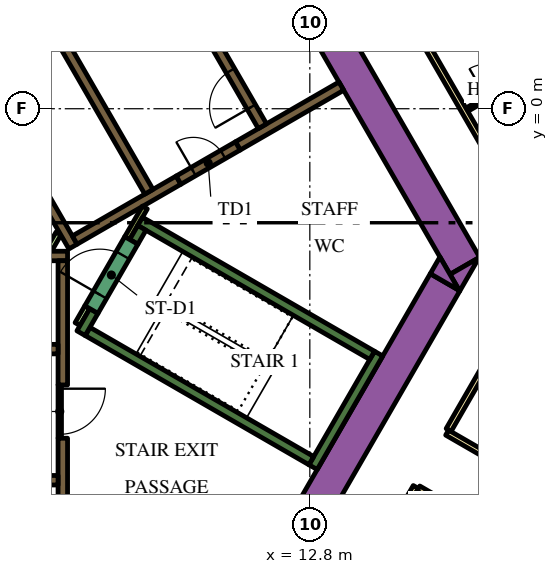
"""IFC4 building model, lengths in metres.
Left out: names, types, materials, properties, quantities, classifications, styles, units other than length and angle.
Written with IfcOpenShell. Run it as: python <this file> out.ifc"""

import sys

from ifc_helpers import new_model, si_unit, direction, frame, frame_2d, origin, place, context, subcontext, project, spatial, polyline, rectangle, outline, extrude, element, fill, save


model = new_model("IFC4")
c1 = context("Model", 3, precision=1e-05, world=origin(), true_north=direction((0.0, 1.0)))
c2 = subcontext(c1, "Body", "Model", "MODEL_VIEW")
j1 = project(units=[si_unit("LENGTHUNIT", "METRE"), si_unit("PLANEANGLEUNIT", "RADIAN")], contexts=[c1])
p1 = place(None, origin())
s1 = spatial("IfcSite", under=j1, at=p1, CompositionType="ELEMENT")
p2 = place(p1, origin())
s2 = spatial("IfcBuilding", under=s1, at=p2, CompositionType="ELEMENT")
p3 = place(p2, frame((0.0, 0.0, 87.6)))
s3 = spatial("IfcBuildingStorey", under=s2, at=p3, CompositionType="ELEMENT", Elevation=87.6)
p4 = place(p3, frame((6.776, 13.364, 0.0), z_axis=(0.0, 0.0, 1.0), x_axis=(0.500004177138, -0.8660229921, 0.0)))
e1 = element("IfcWall", 1, at=p4, inside=s3, PredefinedType="SOLIDWALL", context=c2, shape_type="SweptSolid", body=[
    extrude(rectangle(XDim=20.204, YDim=0.9, at=frame_2d((10.102, 0.0))), origin(), (0.0, 0.0, 1.0), 3.9),
])
p5 = place(p3, origin())
e2 = element("IfcWall", 2, at=p5, inside=s3, PredefinedType="SOLIDWALL", context=c2, shape_type="SweptSolid", body=[
    extrude(outline(polyline([(16.743, -4.8), (16.489, -4.36), (17.251, -3.92), (16.743, -4.8)])), origin(), (0.0, 0.0, 1.0), 3.9),
])
p6 = place(p3, frame((11.695, -12.644, 0.0), z_axis=(0.0, 0.0, 1.0), x_axis=(0.500010229568, 0.86601949766, 0.0)))
e3 = element("IfcWall", 3, at=p6, inside=s3, PredefinedType="SOLIDWALL", context=c2, shape_type="SweptSolid", body=[
    extrude(rectangle(XDim=9.326, YDim=0.9, at=frame_2d((4.663, 0.0))), origin(), (0.0, 0.0, 1.0), 3.9),
])
e4 = element("IfcWall", 4, at=p5, inside=s3, PredefinedType="SOLIDWALL", context=c2, shape_type="SweptSolid", body=[
    extrude(outline(polyline([(16.223, -3.9), (16.732, -4.78), (15.969, -4.34), (16.223, -3.9)])), origin(), (0.0, 0.0, 1.0), 3.9),
])
p7 = place(p3, frame((12.885, -9.431, 0.0), z_axis=(0.0, 0.0, 1.0), x_axis=(0.500020560727, 0.866013532718, 0.0)))
e5 = element("IfcWall", 5, at=p7, inside=s3, PredefinedType="SOLIDWALL", context=c2, shape_type="SweptSolid", body=[
    extrude(rectangle(XDim=3.45, YDim=0.25, at=frame_2d((1.725, 0.0))), origin(), (0.0, 0.0, 1.0), 3.9),
])
p8 = place(p3, frame((12.84, -9.261, 0.0), z_axis=(0.0, 0.0, 1.0), x_axis=(-0.866013990052, 0.500019768644, 0.0)))
e6 = element("IfcWall", 6, at=p8, inside=s3, PredefinedType="SOLIDWALL", context=c2, shape_type="SweptSolid", body=[
    extrude(rectangle(XDim=6.8, YDim=0.25, at=frame_2d((3.4, 0.0))), origin(), (0.0, 0.0, 1.0), 3.9),
])
p9 = place(p3, frame((6.78, -5.906, 0.0), z_axis=(0.0, 0.0, 1.0), x_axis=(0.500223362819, 0.865896406789, 0.0)))
e7 = element("IfcWall", 7, at=p9, inside=s3, PredefinedType="SOLIDWALL", context=c2, shape_type="SweptSolid", body=[
    extrude(rectangle(XDim=0.675, YDim=0.25, at=frame_2d((0.337, 0.0))), origin(), (0.0, 0.0, 1.0), 3.9),
])
p10 = place(p3, frame((8.334, -2.964, 0.0), z_axis=(0.0, 0.0, 1.0), x_axis=(0.866016039709, -0.500016218704, 0.0)))
e8 = element("IfcWall", 8, at=p10, inside=s3, PredefinedType="SOLIDWALL", context=c2, shape_type="SweptSolid", body=[
    extrude(rectangle(XDim=7.05, YDim=0.25, at=frame_2d((3.525, 0.0))), origin(), (0.0, 0.0, 1.0), 3.9),
])
p11 = place(p3, frame((8.168, -3.503, 0.0), z_axis=(0.0, 0.0, 1.0), x_axis=(0.49972245349, 0.866185586049, 0.0)))
e9 = element("IfcWall", 9, at=p11, inside=s3, PredefinedType="SOLIDWALL", context=c2, shape_type="SweptSolid", body=[
    extrude(rectangle(XDim=0.425, YDim=0.25, at=frame_2d((0.212, 0.0))), origin(), (0.0, 0.0, 1.0), 3.9),
])
p12 = place(p3, frame((-5.845, -3.875, 0.0), z_axis=(0.0, 0.0, 1.0), x_axis=(1.0, 0.0, 0.0)))
e10 = element("IfcWall", 10, at=p12, inside=s3, PredefinedType="SOLIDWALL", context=c2, shape_type="SweptSolid", body=[
    extrude(rectangle(XDim=12.27, YDim=0.25, at=frame_2d((6.135, 0.0))), origin(), (0.0, 0.0, 1.0), 3.9),
])
p13 = place(p3, frame((6.3, -8.67, 0.0), z_axis=(0.0, 0.0, 1.0), x_axis=(0.0, -1.0, 0.0)))
e11 = element("IfcWall", 11, at=p13, inside=s3, PredefinedType="SOLIDWALL", context=c2, shape_type="SweptSolid", body=[
    extrude(rectangle(XDim=3.43, YDim=0.25, at=frame_2d((1.715, 0.0))), origin(), (0.0, 0.0, 1.0), 3.9),
])
p14 = place(p3, frame((6.3, -7.268, 0.0), z_axis=(0.0, 0.0, 1.0), x_axis=(0.0, 1.0, 0.0)))
e12 = element("IfcWall", 12, at=p14, inside=s3, PredefinedType="SOLIDWALL", context=c2, shape_type="SweptSolid", body=[
    extrude(rectangle(XDim=3.268, YDim=0.25, at=frame_2d((1.634, 0.0))), origin(), (0.0, 0.0, 1.0), 3.9),
])
p15 = place(p3, frame((13.629, 0.594, 0.0), z_axis=(0.0, 0.0, 1.0), x_axis=(-0.86602790099, -0.499995674689, 0.0)))
e13 = element("IfcWall", 13, at=p15, inside=s3, PredefinedType="SOLIDWALL", context=c2, shape_type="SweptSolid", body=[
    extrude(rectangle(XDim=3.146, YDim=0.25, at=frame_2d((1.573, 0.0))), origin(), (0.0, 0.0, 1.0), 3.9),
])
e14 = element("IfcWall", 14, at=p5, inside=s3, PredefinedType="SOLIDWALL", context=c2, shape_type="SweptSolid", body=[
    extrude(outline(polyline([(0.335, 6.925), (0.335, 7.075), (0.335, 7.075), (0.335, 7.075), (0.245, 7.075), (0.079, 7.363), (0.035, 7.439), (0.252, 7.564), (0.377, 7.348), (6.552, -3.348), (6.677, -3.564), (6.46, -3.689), (4.897, -0.981), (0.332, 6.925), (0.335, 6.925), (0.335, 6.925), (0.335, 6.925)])), origin(), (0.0, 0.0, 1.0), 3.9),
])
p16 = place(p3, frame((6.614, -3.456, 0.0), z_axis=(0.0, 0.0, 1.0), x_axis=(0.86602447079, 0.500001615989, 0.0)))
e15 = element("IfcWall", 15, at=p16, inside=s3, PredefinedType="SOLIDWALL", context=c2, shape_type="SweptSolid", body=[
    extrude(rectangle(XDim=3.154, YDim=0.25, at=frame_2d((1.577, 0.0))), origin(), (0.0, 0.0, 1.0), 3.9),
])
p17 = place(p3, frame((6.945, -5.222, 0.0), z_axis=(0.0, 0.0, 1.0), x_axis=(-0.499818422106, -0.866130212453, 0.0)))
e16 = element("IfcWall", 16, at=p17, inside=s3, PredefinedType="PARTITIONING", context=c2, shape_type="SweptSolid", body=[
    extrude(rectangle(XDim=0.514, YDim=0.15, at=frame_2d((0.257, 0.0))), origin(), (0.0, 0.0, 1.0), 2.75),
])
p18 = place(p3, frame((5.936, -3.718, 0.0), z_axis=(0.0, 0.0, 1.0), x_axis=(0.499890179513, 0.866088799389, 0.0)))
e17 = element("IfcWall", 17, at=p18, inside=s3, PredefinedType="PARTITIONING", context=c2, shape_type="SweptSolid", body=[
    extrude(rectangle(XDim=0.504, YDim=0.15, at=frame_2d((0.252, 0.0))), origin(), (0.0, 0.0, 1.0), 2.75),
])
p19 = place(p3, frame((8.459, -2.599, 0.0), z_axis=(0.0, 0.0, 1.0), x_axis=(-0.500041054325, -0.866001699761, 0.0)))
e18 = element("IfcWall", 18, at=p19, inside=s3, PredefinedType="PARTITIONING", context=c2, shape_type="SweptSolid", body=[
    extrude(rectangle(XDim=0.929, YDim=0.15, at=frame_2d((0.464, 0.0))), origin(), (0.0, 0.0, 1.0), 3.9),
])
p20 = place(p3, frame((-6.175, -9.775, 0.0), z_axis=(0.0, 0.0, 1.0), x_axis=(1.0, 0.0, 0.0)))
e19 = element("IfcWall", 19, at=p20, inside=s3, PredefinedType="SOLIDWALL", context=c2, shape_type="SweptSolid", body=[
    extrude(rectangle(XDim=12.35, YDim=0.25, at=frame_2d((6.175, 0.0))), origin(), (0.0, 0.0, 1.0), 3.9),
])
p21 = place(p20, frame((0.585, 0.0, 0.0)))
e20 = element("IfcOpeningElement", 20, at=p21, cuts=e19, PredefinedType="OPENING", context=c2, shape_type="SweptSolid", body=[
    extrude(rectangle(XDim=1.1, YDim=2.1, at=frame_2d((0.55, 1.05))), frame((0.0, 0.135, 0.0), z_axis=(0.0, -1.0, 0.0), x_axis=(1.0, 0.0, 0.0)), (0.0, 0.0, 1.0), 0.27),
])
p22 = place(p20, frame((3.105, 0.0, 0.0)))
e21 = element("IfcOpeningElement", 21, at=p22, cuts=e19, PredefinedType="OPENING", context=c2, shape_type="SweptSolid", body=[
    extrude(rectangle(XDim=1.1, YDim=2.1, at=frame_2d((0.55, 1.05))), frame((0.0, 0.135, 0.0), z_axis=(0.0, -1.0, 0.0), x_axis=(1.0, 0.0, 0.0)), (0.0, 0.0, 1.0), 0.27),
])
p23 = place(p20, frame((5.625, 0.0, 0.0)))
e22 = element("IfcOpeningElement", 22, at=p23, cuts=e19, PredefinedType="OPENING", context=c2, shape_type="SweptSolid", body=[
    extrude(rectangle(XDim=1.1, YDim=2.1, at=frame_2d((0.55, 1.05))), frame((0.0, 0.135, 0.0), z_axis=(0.0, -1.0, 0.0), x_axis=(1.0, 0.0, 0.0)), (0.0, 0.0, 1.0), 0.27),
])
p24 = place(p20, frame((8.145, 0.0, 0.0)))
e23 = element("IfcOpeningElement", 23, at=p24, cuts=e19, PredefinedType="OPENING", context=c2, shape_type="SweptSolid", body=[
    extrude(rectangle(XDim=1.1, YDim=2.1, at=frame_2d((0.55, 1.05))), frame((0.0, 0.135, 0.0), z_axis=(0.0, -1.0, 0.0), x_axis=(1.0, 0.0, 0.0)), (0.0, 0.0, 1.0), 0.27),
])
p25 = place(p20, frame((10.665, 0.0, 0.0)))
e24 = element("IfcOpeningElement", 24, at=p25, cuts=e19, PredefinedType="OPENING", context=c2, shape_type="SweptSolid", body=[
    extrude(rectangle(XDim=1.1, YDim=2.1, at=frame_2d((0.55, 1.05))), frame((0.0, 0.135, 0.0), z_axis=(0.0, -1.0, 0.0), x_axis=(1.0, 0.0, 0.0)), (0.0, 0.0, 1.0), 0.27),
])
p26 = place(p3, frame((-6.175, -6.325, 0.0), z_axis=(0.0, 0.0, 1.0), x_axis=(1.0, 0.0, 0.0)))
e25 = element("IfcWall", 25, at=p26, inside=s3, PredefinedType="SOLIDWALL", context=c2, shape_type="SweptSolid", body=[
    extrude(rectangle(XDim=12.35, YDim=0.25, at=frame_2d((6.175, 0.0))), origin(), (0.0, 0.0, 1.0), 3.9),
])
p27 = place(p26, frame((3.205, 0.0, 0.0)))
e26 = element("IfcOpeningElement", 26, at=p27, cuts=e25, PredefinedType="OPENING", context=c2, shape_type="SweptSolid", body=[
    extrude(rectangle(XDim=0.9, YDim=2.1, at=frame_2d((0.45, 1.05))), frame((0.0, 0.135, 0.0), z_axis=(0.0, -1.0, 0.0), x_axis=(1.0, 0.0, 0.0)), (0.0, 0.0, 1.0), 0.27),
])
p28 = place(p26, frame((8.145, 0.0, 0.0)))
e27 = element("IfcOpeningElement", 27, at=p28, cuts=e25, PredefinedType="OPENING", context=c2, shape_type="SweptSolid", body=[
    extrude(rectangle(XDim=1.1, YDim=2.1, at=frame_2d((0.55, 1.05))), frame((0.0, 0.135, 0.0), z_axis=(0.0, -1.0, 0.0), x_axis=(1.0, 0.0, 0.0)), (0.0, 0.0, 1.0), 0.27),
])
p29 = place(p26, frame((10.665, 0.0, 0.0)))
e28 = element("IfcOpeningElement", 28, at=p29, cuts=e25, PredefinedType="OPENING", context=c2, shape_type="SweptSolid", body=[
    extrude(rectangle(XDim=1.1, YDim=2.1, at=frame_2d((0.55, 1.05))), frame((0.0, 0.135, 0.0), z_axis=(0.0, -1.0, 0.0), x_axis=(1.0, 0.0, 0.0)), (0.0, 0.0, 1.0), 0.27),
])
p30 = place(p3, frame((11.553, -0.46, 0.0), z_axis=(0.0, 0.0, 1.0), x_axis=(-0.500006514828, 0.866021642414, 0.0)))
e29 = element("IfcWall", 29, at=p30, inside=s3, PredefinedType="SOLIDWALL", context=c2, shape_type="SweptSolid", body=[
    extrude(rectangle(XDim=12.35, YDim=0.25, at=frame_2d((6.175, 0.0))), origin(), (0.0, 0.0, 1.0), 3.9),
])
p31 = place(p30, frame((0.585, 0.0, 0.0)))
e30 = element("IfcOpeningElement", 30, at=p31, cuts=e29, PredefinedType="OPENING", context=c2, shape_type="SweptSolid", body=[
    extrude(rectangle(XDim=1.1, YDim=2.1, at=frame_2d((0.55, 1.05))), frame((0.0, 0.135, 0.0), z_axis=(0.0, -1.0, 0.0), x_axis=(1.0, 0.0, 0.0)), (0.0, 0.0, 1.0), 0.27),
])
p32 = place(p30, frame((3.105, 0.0, 0.0)))
e31 = element("IfcOpeningElement", 31, at=p32, cuts=e29, PredefinedType="OPENING", context=c2, shape_type="SweptSolid", body=[
    extrude(rectangle(XDim=1.1, YDim=2.1, at=frame_2d((0.55, 1.05))), frame((0.0, 0.135, 0.0), z_axis=(0.0, -1.0, 0.0), x_axis=(1.0, 0.0, 0.0)), (0.0, 0.0, 1.0), 0.27),
])
p33 = place(p30, frame((5.625, 0.0, 0.0)))
e32 = element("IfcOpeningElement", 32, at=p33, cuts=e29, PredefinedType="OPENING", context=c2, shape_type="SweptSolid", body=[
    extrude(rectangle(XDim=1.1, YDim=2.1, at=frame_2d((0.55, 1.05))), frame((0.0, 0.135, 0.0), z_axis=(0.0, -1.0, 0.0), x_axis=(1.0, 0.0, 0.0)), (0.0, 0.0, 1.0), 0.27),
])
p34 = place(p3, frame((8.565, -2.185, 0.0), z_axis=(0.0, 0.0, 1.0), x_axis=(-0.499997954832, 0.866026584559, 0.0)))
e33 = element("IfcWall", 33, at=p34, inside=s3, PredefinedType="SOLIDWALL", context=c2, shape_type="SweptSolid", body=[
    extrude(rectangle(XDim=12.35, YDim=0.25, at=frame_2d((6.175, 0.0))), origin(), (0.0, 0.0, 1.0), 3.9),
])
p35 = place(p34, frame((5.725, 0.0, 0.0)))
e34 = element("IfcOpeningElement", 34, at=p35, cuts=e33, PredefinedType="OPENING", context=c2, shape_type="SweptSolid", body=[
    extrude(rectangle(XDim=0.9, YDim=2.1, at=frame_2d((0.45, 1.05))), frame((0.0, 0.135, 0.0), z_axis=(0.0, -1.0, 0.0), x_axis=(1.0, 0.0, 0.0)), (0.0, 0.0, 1.0), 0.27),
])
p36 = place(p3, frame((7.053, -5.284, 0.0), z_axis=(0.0, 0.0, 1.0), x_axis=(0.500078061341, 0.865980330357, 0.0)))
e35 = element("IfcWall", 35, at=p36, inside=s3, PredefinedType="SOLIDWALL", context=c2, shape_type="SweptSolid", body=[
    extrude(rectangle(XDim=2.1, YDim=0.4, at=frame_2d((1.05, 0.0))), origin(), (0.0, 0.0, 1.0), 3.9),
])
p37 = place(p36, frame((0.45, 0.0, 0.0)))
e36 = element("IfcOpeningElement", 36, at=p37, cuts=e35, PredefinedType="OPENING", context=c2, shape_type="SweptSolid", body=[
    extrude(rectangle(XDim=1.2, YDim=2.1, at=frame_2d((0.6, 1.05))), frame((0.0, 0.21, 0.0), z_axis=(0.0, -1.0, 0.0), x_axis=(1.0, 0.0, 0.0)), (0.0, 0.0, 1.0), 0.42),
])
p38 = place(p3, frame((9.346, -1.879, 0.0), z_axis=(0.0, 0.0, 1.0), x_axis=(0.866047807691, 0.499961193289, 0.0)))
e37 = element("IfcWall", 37, at=p38, inside=s3, PredefinedType="SOLIDWALL", context=c2, shape_type="SweptSolid", body=[
    extrude(rectangle(XDim=1.8, YDim=0.25, at=frame_2d((0.9, 0.0))), origin(), (0.0, 0.0, 1.0), 3.9),
])
p39 = place(p38, frame((0.45, 0.0, 0.0)))
e38 = element("IfcOpeningElement", 38, at=p39, cuts=e37, PredefinedType="OPENING", context=c2, shape_type="SweptSolid", body=[
    extrude(rectangle(XDim=0.9, YDim=2.1, at=frame_2d((0.45, 1.05))), frame((0.0, 0.135, 0.0), z_axis=(0.0, -1.0, 0.0), x_axis=(1.0, 0.0, 0.0)), (0.0, 0.0, 1.0), 0.27),
])
p40 = place(p3, frame((6.22, -7.266, 0.0), z_axis=(0.0, 0.0, 1.0), x_axis=(0.0, -1.0, 0.0)))
e39 = element("IfcWall", 39, at=p40, inside=s3, PredefinedType="PARTITIONING", context=c2, shape_type="SweptSolid", body=[
    extrude(rectangle(XDim=1.4, YDim=0.09, at=frame_2d((0.7, 0.0))), origin(), (0.0, 0.0, 1.0), 2.75),
])
p41 = place(p40, frame((0.1, 0.0, 0.0)))
e40 = element("IfcOpeningElement", 40, at=p41, cuts=e39, PredefinedType="OPENING", context=c2, shape_type="SweptSolid", body=[
    extrude(rectangle(XDim=1.2, YDim=2.1, at=frame_2d((0.6, 1.05))), frame((0.0, 0.055, 0.0), z_axis=(0.0, -1.0, 0.0), x_axis=(1.0, 0.0, 0.0)), (0.0, 0.0, 1.0), 0.11),
])
p42 = place(p3, frame((16.412, -8.523, 0.0), z_axis=(0.0, 0.0, 1.0), x_axis=(0.866025629663, -0.499999608766, 0.0)))
e41 = element("IfcWall", 41, at=p42, inside=s3, PredefinedType="PARTITIONING", context=c2, shape_type="SweptSolid", body=[
    extrude(rectangle(XDim=13.624, YDim=0.15, at=frame_2d((6.812, 0.0))), origin(), (0.0, 0.0, 1.0), 2.75),
])
p43 = place(p42, frame((4.134, 0.0, 0.0)))
e42 = element("IfcOpeningElement", 42, at=p43, cuts=e41, PredefinedType="OPENING", context=c2, shape_type="SweptSolid", body=[
    extrude(rectangle(XDim=1.0, YDim=2.1, at=frame_2d((0.5, 1.05))), frame((0.0, 0.085, 0.0), z_axis=(0.0, -1.0, 0.0), x_axis=(1.0, 0.0, 0.0)), (0.0, 0.0, 1.0), 0.17),
])
p44 = place(p3, frame((19.081, -3.9, 0.0), z_axis=(0.0, 0.0, 1.0), x_axis=(-0.499974327079, -0.866040225545, 0.0)))
e43 = element("IfcWall", 43, at=p44, inside=s3, PredefinedType="PARTITIONING", context=c2, shape_type="SweptSolid", body=[
    extrude(rectangle(XDim=5.258, YDim=0.15, at=frame_2d((2.629, 0.0))), origin(), (0.0, 0.0, 1.0), 2.75),
])
p45 = place(p44, frame((0.18, 0.0, 0.0)))
e44 = element("IfcOpeningElement", 44, at=p45, cuts=e43, PredefinedType="OPENING", context=c2, shape_type="SweptSolid", body=[
    extrude(rectangle(XDim=1.0, YDim=2.1, at=frame_2d((0.5, 1.05))), frame((0.0, 0.085, 0.0), z_axis=(0.0, -1.0, 0.0), x_axis=(1.0, 0.0, 0.0)), (0.0, 0.0, 1.0), 0.17),
])
p46 = place(p3, frame((6.163, 18.475, 0.0), z_axis=(0.0, 0.0, 1.0), x_axis=(0.500001317485, -0.866024643133, 0.0)))
e45 = element("IfcWall", 45, at=p46, inside=s3, PredefinedType="PARTITIONING", context=c2, shape_type="SweptSolid", body=[
    extrude(rectangle(XDim=25.767, YDim=0.15, at=frame_2d((12.883, 0.0))), origin(), (0.0, 0.0, 1.0), 2.75),
])
p47 = place(p46, frame((24.241, 0.0, 0.0)))
e46 = element("IfcOpeningElement", 46, at=p47, cuts=e45, PredefinedType="OPENING", context=c2, shape_type="SweptSolid", body=[
    extrude(rectangle(XDim=1.0, YDim=2.1, at=frame_2d((0.5, 1.05))), frame((0.0, 0.085, 0.0), z_axis=(0.0, -1.0, 0.0), x_axis=(1.0, 0.0, 0.0)), (0.0, 0.0, 1.0), 0.17),
])
p48 = place(p46, frame((13.144, 0.0, 0.0)))
e47 = element("IfcOpeningElement", 47, at=p48, cuts=e45, PredefinedType="OPENING", context=c2, shape_type="SweptSolid", body=[
    extrude(rectangle(XDim=1.0, YDim=2.1, at=frame_2d((0.5, 1.05))), frame((0.0, 0.085, 0.0), z_axis=(0.0, -1.0, 0.0), x_axis=(1.0, 0.0, 0.0)), (0.0, 0.0, 1.0), 0.17),
])
p49 = place(p46, frame((10.874, 0.0, 0.0)))
e48 = element("IfcOpeningElement", 48, at=p49, cuts=e45, PredefinedType="OPENING", context=c2, shape_type="SweptSolid", body=[
    extrude(rectangle(XDim=0.9, YDim=2.1, at=frame_2d((0.45, 1.05))), frame((0.0, 0.085, 0.0), z_axis=(0.0, -1.0, 0.0), x_axis=(1.0, 0.0, 0.0)), (0.0, 0.0, 1.0), 0.17),
])
p50 = place(p46, frame((3.718, 0.0, 0.0)))
e49 = element("IfcOpeningElement", 49, at=p50, cuts=e45, PredefinedType="OPENING", context=c2, shape_type="SweptSolid", body=[
    extrude(rectangle(XDim=1.1, YDim=2.1, at=frame_2d((0.55, 1.05))), frame((0.0, 0.085, 0.0), z_axis=(0.0, -1.0, 0.0), x_axis=(1.0, 0.0, 0.0)), (0.0, 0.0, 1.0), 0.17),
])
p51 = place(p46, frame((2.411, 0.0, 0.0)))
e50 = element("IfcOpeningElement", 50, at=p51, cuts=e45, PredefinedType="OPENING", context=c2, shape_type="SweptSolid", body=[
    extrude(rectangle(XDim=1.0, YDim=2.1, at=frame_2d((0.5, 1.05))), frame((0.0, 0.085, 0.0), z_axis=(0.0, -1.0, 0.0), x_axis=(1.0, 0.0, 0.0)), (0.0, 0.0, 1.0), 0.17),
])
p52 = place(p3, frame((15.587, -9.952, 0.0), z_axis=(0.0, 0.0, 1.0), x_axis=(-0.500016618951, -0.866015808616, 0.0)))
e51 = element("IfcWall", 51, at=p52, inside=s3, PredefinedType="PARTITIONING", context=c2, shape_type="SweptSolid", body=[
    extrude(rectangle(XDim=5.268, YDim=0.15, at=frame_2d((2.634, 0.0))), origin(), (0.0, 0.0, 1.0), 2.75),
])
p53 = place(p3, frame((27.386, -16.764, 0.0), z_axis=(0.0, 0.0, 1.0), x_axis=(-0.866022585856, 0.500004880763, 0.0)))
e52 = element("IfcWall", 52, at=p53, inside=s3, PredefinedType="PARTITIONING", context=c2, shape_type="SweptSolid", body=[
    extrude(rectangle(XDim=13.544, YDim=0.15, at=frame_2d((6.772, 0.0))), origin(), (0.0, 0.0, 1.0), 2.75),
])
p54 = place(p53, frame((12.214, 0.0, 0.0)))
e53 = element("IfcOpeningElement", 53, at=p54, cuts=e52, PredefinedType="OPENING", context=c2, shape_type="SweptSolid", body=[
    extrude(rectangle(XDim=1.0, YDim=2.1, at=frame_2d((0.5, 1.05))), frame((0.0, 0.085, 0.0), z_axis=(0.0, -1.0, 0.0), x_axis=(1.0, 0.0, 0.0)), (0.0, 0.0, 1.0), 0.17),
])
p55 = place(p53, frame((8.49, 0.0, 0.0)))
e54 = element("IfcOpeningElement", 54, at=p55, cuts=e52, PredefinedType="OPENING", context=c2, shape_type="SweptSolid", body=[
    extrude(rectangle(XDim=1.0, YDim=2.1, at=frame_2d((0.5, 1.05))), frame((0.0, 0.085, 0.0), z_axis=(0.0, -1.0, 0.0), x_axis=(1.0, 0.0, 0.0)), (0.0, 0.0, 1.0), 0.17),
])
p56 = place(p3, frame((16.931, -0.026, 0.0), z_axis=(0.0, 0.0, 1.0), x_axis=(0.866059108428, 0.4999416173, 0.0)))
e55 = element("IfcWall", 55, at=p56, inside=s3, PredefinedType="PARTITIONING", context=c2, shape_type="SweptSolid", body=[
    extrude(rectangle(XDim=2.7, YDim=0.1, at=frame_2d((1.35, 0.0))), origin(), (0.0, 0.0, 1.0), 2.75),
])
p57 = place(p56, frame((0.6, 0.0, 0.0)))
e56 = element("IfcOpeningElement", 56, at=p57, cuts=e55, PredefinedType="OPENING", context=c2, shape_type="SweptSolid", body=[
    extrude(rectangle(XDim=0.9, YDim=2.1, at=frame_2d((0.45, 1.05))), frame((0.0, 0.06, 0.0), z_axis=(0.0, -1.0, 0.0), x_axis=(1.0, 0.0, 0.0)), (0.0, 0.0, 1.0), 0.12),
])
p58 = place(p31, origin())
e57 = element("IfcDoor", 57, at=p58, inside=s3, OperationType="DOUBLE_DOOR_SLIDING", PredefinedType="DOOR", context=c2, shape_type="SweptSolid", body=[
    extrude(rectangle(XDim=1.1, YDim=2.1, at=frame_2d((0.55, 1.05))), frame((0.0, 0.025, 0.0), z_axis=(0.0, -1.0, 0.0), x_axis=(1.0, 0.0, 0.0)), (0.0, 0.0, 1.0), 0.05),
])
fill(e30, e57)
p59 = place(p37, origin())
e58 = element("IfcDoor", 58, at=p59, inside=s3, OperationType="SINGLE_SWING_LEFT", PredefinedType="DOOR", context=c2, shape_type="SweptSolid", body=[
    extrude(rectangle(XDim=1.2, YDim=2.1, at=frame_2d((0.6, 1.05))), frame((0.0, 0.025, 0.0), z_axis=(0.0, -1.0, 0.0), x_axis=(1.0, 0.0, 0.0)), (0.0, 0.0, 1.0), 0.05),
])
fill(e36, e58)
p60 = place(p39, origin())
e59 = element("IfcDoor", 59, at=p60, inside=s3, OperationType="SINGLE_SWING_LEFT", PredefinedType="DOOR", context=c2, shape_type="SweptSolid", body=[
    extrude(rectangle(XDim=0.9, YDim=2.1, at=frame_2d((0.45, 1.05))), frame((0.0, 0.025, 0.0), z_axis=(0.0, -1.0, 0.0), x_axis=(1.0, 0.0, 0.0)), (0.0, 0.0, 1.0), 0.05),
])
fill(e38, e59)
p61 = place(p41, origin())
e60 = element("IfcDoor", 60, at=p61, inside=s3, OperationType="SINGLE_SWING_LEFT", PredefinedType="DOOR", context=c2, shape_type="SweptSolid", body=[
    extrude(rectangle(XDim=1.2, YDim=2.1, at=frame_2d((0.6, 1.05))), frame((0.0, 0.025, 0.0), z_axis=(0.0, -1.0, 0.0), x_axis=(1.0, 0.0, 0.0)), (0.0, 0.0, 1.0), 0.05),
])
fill(e40, e60)
p62 = place(p54, origin())
e61 = element("IfcDoor", 61, at=p62, inside=s3, OperationType="SINGLE_SWING_RIGHT", PredefinedType="DOOR", context=c2, shape_type="SweptSolid", body=[
    extrude(rectangle(XDim=1.0, YDim=2.1, at=frame_2d((0.5, 1.05))), frame((0.0, 0.025, 0.0), z_axis=(0.0, -1.0, 0.0), x_axis=(1.0, 0.0, 0.0)), (0.0, 0.0, 1.0), 0.05),
])
fill(e53, e61)
save(model, sys.argv[1])
